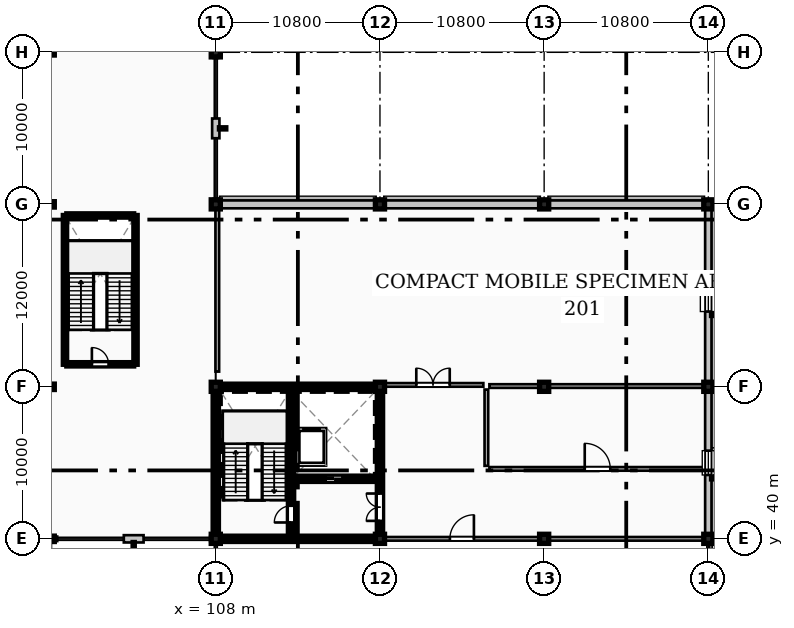
"""IFC4 building model, lengths in metres.
Left out: names, types, materials, properties, quantities, classifications, styles, units other than length and angle.
Written with IfcOpenShell. Run it as: python <this file> out.ifc"""

import sys

from ifc_helpers import new_model, si_unit, direction, frame, frame_2d, origin, origin_2d, place, context, subcontext, project, spatial, rectangle, hollow_circle, extrude, element, fill, save


model = new_model("IFC4")
c1 = context("Model", 3, precision=1e-05, world=origin(), true_north=direction((0.0, 1.0)))
c2 = subcontext(c1, "Body", "Model", "MODEL_VIEW")
j1 = project(units=[si_unit("LENGTHUNIT", "METRE"), si_unit("PLANEANGLEUNIT", "RADIAN")], contexts=[c1])
p1 = place(None, origin())
s1 = spatial("IfcSite", under=j1, at=p1, CompositionType="ELEMENT")
p2 = place(p1, origin())
s2 = spatial("IfcBuilding", under=s1, at=p2, CompositionType="ELEMENT")
p3 = place(p2, frame((0.0, 0.0, 9.6)))
s3 = spatial("IfcBuildingStorey", under=s2, at=p3, CompositionType="ELEMENT", Elevation=9.6)
for number, where, z_axis, x_axis in (
    (1, (97.2, 40.0, 0.0), (0.0, 0.0, 1.0), (1.0, 0.0, 0.0)),
    (2, (97.2, 50.0, 0.0), (0.0, 0.0, 1.0), (1.0, 0.0, 0.0)),
    (3, (97.2, 62.0, 0.0), (0.0, 0.0, 1.0), (1.0, 0.0, 0.0)),
    (4, (97.2, 72.0, 0.0), (0.0, 0.0, 1.0), (1.0, 0.0, 0.0)),
):
    element("IfcColumn", number, at=place(p3, frame(where, z_axis=z_axis, x_axis=x_axis)), inside=s3, PredefinedType="COLUMN", context=c2, shape_type="SweptSolid", body=[
        extrude(hollow_circle(Radius=0.178, WallThickness=0.016, at=origin_2d()), origin(), (0.0, 0.0, 1.0), 4.8),
    ])
for number, where, z_axis, x_axis in (
    (5, (108.0, 40.0, 0.0), (0.0, 0.0, 1.0), (1.0, 0.0, 0.0)),
    (6, (108.0, 50.0, 0.0), (0.0, 0.0, 1.0), (1.0, 0.0, 0.0)),
    (7, (108.0, 62.0, 0.0), (0.0, 0.0, 1.0), (1.0, 0.0, 0.0)),
    (8, (108.0, 72.0, 0.0), (0.0, 0.0, 1.0), (1.0, 0.0, 0.0)),
    (9, (118.8, 40.0, 0.0), (0.0, 0.0, 1.0), (1.0, 0.0, 0.0)),
    (10, (118.8, 50.0, 0.0), (0.0, 0.0, 1.0), (1.0, 0.0, 0.0)),
    (11, (118.8, 62.0, 0.0), (0.0, 0.0, 1.0), (1.0, 0.0, 0.0)),
    (12, (129.6, 40.0, 0.0), (0.0, 0.0, 1.0), (1.0, 0.0, 0.0)),
    (13, (129.6, 50.0, 0.0), (0.0, 0.0, 1.0), (1.0, 0.0, 0.0)),
    (14, (129.6, 62.0, 0.0), (0.0, 0.0, 1.0), (1.0, 0.0, 0.0)),
    (15, (140.4, 40.0, 0.0), (0.0, 0.0, 1.0), (1.0, 0.0, 0.0)),
    (16, (140.4, 50.0, 0.0), (0.0, 0.0, 1.0), (1.0, 0.0, 0.0)),
    (17, (140.4, 62.0, 0.0), (0.0, 0.0, 1.0), (1.0, 0.0, 0.0)),
):
    element("IfcColumn", number, at=place(p3, frame(where, z_axis=z_axis, x_axis=x_axis)), inside=s3, PredefinedType="COLUMN", context=c2, shape_type="SweptSolid", body=[
        extrude(rectangle(XDim=0.6, YDim=0.6, at=origin_2d()), origin(), (0.0, 0.0, 1.0), 4.8),
    ])
for number, where, z_axis, x_axis in (
    (18, (108.0, 39.855, 0.0), (0.0, 0.0, 1.0), (0.0, -1.0, 0.0)),
    (19, (140.4, 39.63, 0.0), (0.0, 0.0, 1.0), (0.0, 1.0, 0.0)),
):
    element("IfcWall", number, at=place(p3, frame(where, z_axis=z_axis, x_axis=x_axis)), inside=s3, PredefinedType="STANDARD", context=c2, shape_type="SweptSolid", body=[
        extrude(rectangle(XDim=0.225, YDim=0.3, at=frame_2d((0.113, 0.0))), origin(), (0.0, 0.0, 1.0), 4.56),
    ])
p4 = place(p3, frame((140.4, 40.145, 0.0), z_axis=(0.0, 0.0, 1.0), x_axis=(0.0, 1.0, 0.0)))
e20 = element("IfcWall", 20, at=p4, inside=s3, PredefinedType="STANDARD", context=c2, shape_type="SweptSolid", body=[
    extrude(rectangle(XDim=9.71, YDim=0.42, at=frame_2d((4.855, 0.0))), origin(), (0.0, 0.0, 1.0), 4.13),
])
p5 = place(p4, frame((4.055, 0.0, 1.2)))
e21 = element("IfcOpeningElement", 21, at=p5, cuts=e20, PredefinedType="OPENING", context=c2, shape_type="SweptSolid", body=[
    extrude(rectangle(XDim=1.6, YDim=1.8, at=frame_2d((0.8, 0.9))), frame((0.0, 0.22, 0.0), z_axis=(0.0, -1.0, 0.0), x_axis=(1.0, 0.0, 0.0)), (0.0, 0.0, 1.0), 0.44),
])
p6 = place(p3, frame((140.4, 50.145, 0.0), z_axis=(0.0, 0.0, 1.0), x_axis=(0.0, 1.0, 0.0)))
e22 = element("IfcWall", 22, at=p6, inside=s3, PredefinedType="STANDARD", context=c2, shape_type="SweptSolid", body=[
    extrude(rectangle(XDim=11.71, YDim=0.42, at=frame_2d((5.855, 0.0))), origin(), (0.0, 0.0, 1.0), 4.13),
])
p7 = place(p6, frame((4.805, 0.0, 1.2)))
e23 = element("IfcOpeningElement", 23, at=p7, cuts=e22, PredefinedType="OPENING", context=c2, shape_type="SweptSolid", body=[
    extrude(rectangle(XDim=2.1, YDim=1.6, at=frame_2d((1.05, 0.8))), frame((0.0, 0.22, 0.0), z_axis=(0.0, -1.0, 0.0), x_axis=(1.0, 0.0, 0.0)), (0.0, 0.0, 1.0), 0.44),
])
p8 = place(p3, frame((140.255, 62.0, 0.0), z_axis=(0.0, 0.0, 1.0), x_axis=(-1.0, 0.0, 0.0)))
e24 = element("IfcWall", 24, at=p8, inside=s3, PredefinedType="SOLIDWALL", context=c2, shape_type="SweptSolid", body=[
    extrude(rectangle(XDim=10.51, YDim=0.52, at=frame_2d((5.255, 0.0))), origin(), (0.0, 0.0, 1.0), 4.13),
])
for number, where, z_axis, x_axis in (
    (25, (129.455, 62.0, 0.0), (0.0, 0.0, 1.0), (-1.0, 0.0, 0.0)),
    (26, (118.655, 62.0, 0.0), (0.0, 0.0, 1.0), (-1.0, 0.0, 0.0)),
):
    element("IfcWall", number, at=place(p3, frame(where, z_axis=z_axis, x_axis=x_axis)), inside=s3, PredefinedType="SOLIDWALL", context=c2, shape_type="SweptSolid", body=[
        extrude(rectangle(XDim=10.51, YDim=0.52, at=frame_2d((5.255, 0.0))), origin(), (0.0, 0.0, 1.0), 3.929),
    ])
p9 = place(p3, frame((108.0, 66.35, 0.0), z_axis=(0.0, 0.0, 1.0), x_axis=(0.0, 1.0, 0.0)))
e27 = element("IfcWall", 27, at=p9, inside=s3, PredefinedType="STANDARD", context=c2, shape_type="SweptSolid", body=[
    extrude(rectangle(XDim=1.3, YDim=0.48, at=frame_2d((0.65, 0.0))), origin(), (0.0, 0.0, 1.0), 4.56),
])
for number, where, z_axis, x_axis in (
    (28, (108.0, 62.145, 0.0), (0.0, 0.0, 1.0), (0.0, 1.0, 0.0)),
    (29, (108.0, 71.63, 0.0), (0.0, 0.0, 1.0), (0.0, 1.0, 0.0)),
):
    element("IfcWall", number, at=place(p3, frame(where, z_axis=z_axis, x_axis=x_axis)), inside=s3, PredefinedType="STANDARD", context=c2, shape_type="SweptSolid", body=[
        extrude(rectangle(XDim=0.225, YDim=0.3, at=frame_2d((0.113, 0.0))), origin(), (0.0, 0.0, 1.0), 4.56),
    ])
p10 = place(p3, frame((101.95, 40.0, 0.0), z_axis=(0.0, 0.0, 1.0), x_axis=(1.0, 0.0, 0.0)))
e30 = element("IfcWall", 30, at=p10, inside=s3, PredefinedType="STANDARD", context=c2, shape_type="SweptSolid", body=[
    extrude(rectangle(XDim=1.3, YDim=0.48, at=frame_2d((0.65, 0.0))), origin(), (0.0, 0.0, 1.0), 4.11),
])
for number, where, z_axis, x_axis in (
    (31, (97.345, 40.0, 0.0), (0.0, 0.0, 1.0), (1.0, 0.0, 0.0)),
    (32, (107.63, 40.0, 0.0), (0.0, 0.0, 1.0), (1.0, 0.0, 0.0)),
):
    element("IfcWall", number, at=place(p3, frame(where, z_axis=z_axis, x_axis=x_axis)), inside=s3, PredefinedType="STANDARD", context=c2, shape_type="SweptSolid", body=[
        extrude(rectangle(XDim=0.225, YDim=0.3, at=frame_2d((0.113, 0.0))), origin(), (0.0, 0.0, 1.0), 4.56),
    ])
for number, where, z_axis, x_axis in (
    (33, (108.3, 40.0, 0.0), (0.0, 0.0, 1.0), (1.0, 0.0, 0.0)),
    (34, (108.3, 50.0, 0.0), (0.0, 0.0, 1.0), (1.0, 0.0, 0.0)),
):
    element("IfcWall", number, at=place(p3, frame(where, z_axis=z_axis, x_axis=x_axis)), inside=s3, PredefinedType="SHEAR", context=c2, shape_type="SweptSolid", body=[
        extrude(rectangle(XDim=10.2, YDim=0.35, at=frame_2d((5.1, 0.0))), origin(), (0.0, 0.0, 1.0), 4.56),
    ])
p11 = place(p3, frame((108.0, 40.3, 0.0), z_axis=(0.0, 0.0, 1.0), x_axis=(0.0, 1.0, 0.0)))
e35 = element("IfcWall", 35, at=p11, inside=s3, PredefinedType="SHEAR", context=c2, shape_type="SweptSolid", body=[
    extrude(rectangle(XDim=9.4, YDim=0.35, at=frame_2d((4.7, 0.0))), origin(), (0.0, 0.0, 1.0), 4.56),
])
p12 = place(p3, frame((118.8, 40.3, 0.0), z_axis=(0.0, 0.0, 1.0), x_axis=(0.0, 1.0, 0.0)))
e36 = element("IfcWall", 36, at=p12, inside=s3, PredefinedType="SHEAR", context=c2, shape_type="SweptSolid", body=[
    extrude(rectangle(XDim=9.4, YDim=0.35, at=frame_2d((4.7, 0.0))), origin(), (0.0, 0.0, 1.0), 4.56),
])
p13 = place(p12, frame((0.88, 0.0, 0.0)))
e37 = element("IfcOpeningElement", 37, at=p13, cuts=e36, PredefinedType="OPENING", context=c2, shape_type="SweptSolid", body=[
    extrude(rectangle(XDim=1.8, YDim=2.25, at=frame_2d((0.9, 1.125))), frame((0.0, 0.185, 0.0), z_axis=(0.0, -1.0, 0.0), x_axis=(1.0, 0.0, 0.0)), (0.0, 0.0, 1.0), 0.37),
])
p14 = place(p3, frame((112.95, 40.175, 0.0), z_axis=(0.0, 0.0, 1.0), x_axis=(0.0, 1.0, 0.0)))
e38 = element("IfcWall", 38, at=p14, inside=s3, PredefinedType="SHEAR", context=c2, shape_type="SweptSolid", body=[
    extrude(rectangle(XDim=9.65, YDim=0.35, at=frame_2d((4.825, 0.0))), origin(), (0.0, 0.0, 1.0), 4.56),
])
p15 = place(p14, frame((0.9, 0.0, 0.0)))
e39 = element("IfcOpeningElement", 39, at=p15, cuts=e38, PredefinedType="OPENING", context=c2, shape_type="SweptSolid", body=[
    extrude(rectangle(XDim=1.1, YDim=2.2, at=frame_2d((0.55, 1.1))), frame((0.0, 0.185, 0.0), z_axis=(0.0, -1.0, 0.0), x_axis=(1.0, 0.0, 0.0)), (0.0, 0.0, 1.0), 0.37),
])
p16 = place(p3, frame((113.13, 43.95, 0.0), z_axis=(0.0, 0.0, 1.0), x_axis=(1.0, 0.0, 0.0)))
e40 = element("IfcWall", 40, at=p16, inside=s3, PredefinedType="SHEAR", context=c2, shape_type="SweptSolid", body=[
    extrude(rectangle(XDim=5.49, YDim=0.35, at=frame_2d((2.745, 0.0))), origin(), (0.0, 0.0, 1.0), 4.56),
])
p17 = place(p16, frame((2.1, 0.0, 0.0)))
e41 = element("IfcOpeningElement", 41, at=p17, cuts=e40, PredefinedType="OPENING", context=c2, shape_type="SweptSolid", body=[
    extrude(rectangle(XDim=1.1, YDim=2.2, at=frame_2d((0.55, 1.1))), frame((0.0, 0.185, 0.0), z_axis=(0.0, -1.0, 0.0), x_axis=(1.0, 0.0, 0.0)), (0.0, 0.0, 1.0), 0.37),
])
for number, where, z_axis, x_axis in (
    (42, (98.08, 51.48, 0.0), (0.0, 0.0, 1.0), (0.0, 1.0, 0.0)),
    (43, (102.72, 51.48, 0.0), (0.0, 0.0, 1.0), (0.0, 1.0, 0.0)),
):
    element("IfcWall", number, at=place(p3, frame(where, z_axis=z_axis, x_axis=x_axis)), inside=s3, PredefinedType="SHEAR", context=c2, shape_type="SweptSolid", body=[
        extrude(rectangle(XDim=9.79, YDim=0.22, at=frame_2d((4.895, 0.0))), origin(), (0.0, 0.0, 1.0), 4.56),
    ])
p18 = place(p3, frame((98.2, 61.27, 0.0), z_axis=(0.0, 0.0, 1.0), x_axis=(1.0, 0.0, 0.0)))
e44 = element("IfcWall", 44, at=p18, inside=s3, PredefinedType="SHEAR", context=c2, shape_type="SweptSolid", body=[
    extrude(rectangle(XDim=4.4, YDim=0.22, at=frame_2d((2.2, 0.0))), origin(), (0.0, 0.0, 1.0), 4.56),
])
p19 = place(p3, frame((98.2, 51.48, 0.0), z_axis=(0.0, 0.0, 1.0), x_axis=(1.0, 0.0, 0.0)))
e45 = element("IfcWall", 45, at=p19, inside=s3, PredefinedType="SHEAR", context=c2, shape_type="SweptSolid", body=[
    extrude(rectangle(XDim=4.4, YDim=0.22, at=frame_2d((2.2, 0.0))), origin(), (0.0, 0.0, 1.0), 4.56),
])
p20 = place(p19, frame((1.65, 0.0, 0.0)))
e46 = element("IfcOpeningElement", 46, at=p20, cuts=e45, PredefinedType="OPENING", context=c2, shape_type="SweptSolid", body=[
    extrude(rectangle(XDim=1.1, YDim=2.2, at=frame_2d((0.55, 1.1))), frame((0.0, 0.12, 0.0), z_axis=(0.0, -1.0, 0.0), x_axis=(1.0, 0.0, 0.0)), (0.0, 0.0, 1.0), 0.24),
])
p21 = place(p3, frame((118.98, 40.0, 0.0), z_axis=(0.0, 0.0, 1.0), x_axis=(1.0, 0.0, 0.0)))
e47 = element("IfcWall", 47, at=p21, inside=s3, PredefinedType="SOLIDWALL", context=c2, shape_type="SweptSolid", body=[
    extrude(rectangle(XDim=10.42, YDim=0.24, at=frame_2d((5.21, 0.0))), origin(), (0.0, 0.0, 1.0), 3.929),
])
p22 = place(p21, frame((4.42, 0.0, 0.0)))
e48 = element("IfcOpeningElement", 48, at=p22, cuts=e47, PredefinedType="OPENING", context=c2, shape_type="SweptSolid", body=[
    extrude(rectangle(XDim=1.58, YDim=2.48, at=frame_2d((0.79, 1.24))), frame((0.0, 0.13, 0.0), z_axis=(0.0, -1.0, 0.0), x_axis=(1.0, 0.0, 0.0)), (0.0, 0.0, 1.0), 0.26),
])
p23 = place(p3, frame((129.8, 40.0, 0.0), z_axis=(0.0, 0.0, 1.0), x_axis=(1.0, 0.0, 0.0)))
e49 = element("IfcWall", 49, at=p23, inside=s3, PredefinedType="SOLIDWALL", context=c2, shape_type="SweptSolid", body=[
    extrude(rectangle(XDim=10.42, YDim=0.24, at=frame_2d((5.21, 0.0))), origin(), (0.0, 0.0, 1.0), 4.13),
])
p24 = place(p3, frame((126.0, 44.6, 0.0), z_axis=(0.0, 0.0, 1.0), x_axis=(1.0, 0.0, 0.0)))
e50 = element("IfcWall", 50, at=p24, inside=s3, PredefinedType="SOLIDWALL", context=c2, shape_type="SweptSolid", body=[
    extrude(rectangle(XDim=14.22, YDim=0.24, at=frame_2d((7.11, 0.0))), origin(), (0.0, 0.0, 1.0), 4.52),
])
p25 = place(p24, frame((6.27, 0.0, 0.0)))
e51 = element("IfcOpeningElement", 51, at=p25, cuts=e50, PredefinedType="OPENING", context=c2, shape_type="SweptSolid", body=[
    extrude(rectangle(XDim=1.68, YDim=2.52, at=frame_2d((0.84, 1.26))), frame((0.0, 0.13, 0.0), z_axis=(0.0, -1.0, 0.0), x_axis=(1.0, 0.0, 0.0)), (0.0, 0.0, 1.0), 0.26),
])
p26 = place(p3, frame((118.98, 50.125, 0.0), z_axis=(0.0, 0.0, 1.0), x_axis=(1.0, 0.0, 0.0)))
e52 = element("IfcWall", 52, at=p26, inside=s3, PredefinedType="SOLIDWALL", context=c2, shape_type="SweptSolid", body=[
    extrude(rectangle(XDim=6.62, YDim=0.24, at=frame_2d((3.31, 0.0))), origin(), (0.0, 0.0, 1.0), 3.929),
])
p27 = place(p26, frame((2.21, 0.0, 0.0)))
e53 = element("IfcOpeningElement", 53, at=p27, cuts=e52, PredefinedType="OPENING", context=c2, shape_type="SweptSolid", body=[
    extrude(rectangle(XDim=2.2, YDim=2.6, at=frame_2d((1.1, 1.3))), frame((0.0, 0.13, 0.0), z_axis=(0.0, -1.0, 0.0), x_axis=(1.0, 0.0, 0.0)), (0.0, 0.0, 1.0), 0.26),
])
p28 = place(p3, frame((126.0, 50.05, 0.0), z_axis=(0.0, 0.0, 1.0), x_axis=(1.0, 0.0, 0.0)))
e54 = element("IfcWall", 54, at=p28, inside=s3, PredefinedType="SOLIDWALL", context=c2, shape_type="SweptSolid", body=[
    extrude(rectangle(XDim=3.4, YDim=0.24, at=frame_2d((1.7, 0.0))), origin(), (0.0, 0.0, 1.0), 3.929),
])
p29 = place(p3, frame((129.8, 50.05, 0.0), z_axis=(0.0, 0.0, 1.0), x_axis=(1.0, 0.0, 0.0)))
e55 = element("IfcWall", 55, at=p29, inside=s3, PredefinedType="SOLIDWALL", context=c2, shape_type="SweptSolid", body=[
    extrude(rectangle(XDim=10.42, YDim=0.24, at=frame_2d((5.21, 0.0))), origin(), (0.0, 0.0, 1.0), 4.13),
])
p30 = place(p3, frame((108.1, 51.0, 0.0), z_axis=(0.0, 0.0, 1.0), x_axis=(0.0, 1.0, 0.0)))
e56 = element("IfcWall", 56, at=p30, inside=s3, PredefinedType="SOLIDWALL", context=c2, shape_type="SweptSolid", body=[
    extrude(rectangle(XDim=10.82, YDim=0.24, at=frame_2d((5.41, 0.0))), origin(), (0.0, 0.0, 1.0), 3.92),
])
p31 = place(p3, frame((125.8, 44.8, 0.0), z_axis=(0.0, 0.0, 1.0), x_axis=(0.0, 1.0, 0.0)))
e57 = element("IfcWall", 57, at=p31, inside=s3, PredefinedType="SOLIDWALL", context=c2, shape_type="SweptSolid", body=[
    extrude(rectangle(XDim=5.02, YDim=0.24, at=frame_2d((2.51, 0.0))), origin(), (0.0, 0.0, 1.0), 4.52),
])
p32 = place(p5, origin())
e58 = element("IfcWindow", 58, at=p32, inside=s3, PartitioningType="SINGLE_PANEL", PredefinedType="WINDOW", context=c2, shape_type="SweptSolid", body=[
    extrude(rectangle(XDim=1.6, YDim=1.8, at=frame_2d((0.8, 0.9))), frame((0.0, 0.03, 0.0), z_axis=(0.0, -1.0, 0.0), x_axis=(1.0, 0.0, 0.0)), (0.0, 0.0, 1.0), 0.06),
])
fill(e21, e58)
p33 = place(p7, origin())
e59 = element("IfcWindow", 59, at=p33, inside=s3, PartitioningType="SINGLE_PANEL", PredefinedType="WINDOW", context=c2, shape_type="SweptSolid", body=[
    extrude(rectangle(XDim=2.1, YDim=1.6, at=frame_2d((1.05, 0.8))), frame((0.0, 0.03, 0.0), z_axis=(0.0, -1.0, 0.0), x_axis=(1.0, 0.0, 0.0)), (0.0, 0.0, 1.0), 0.06),
])
fill(e23, e59)
p34 = place(p15, origin())
e60 = element("IfcDoor", 60, at=p34, inside=s3, OperationType="SINGLE_SWING_LEFT", PredefinedType="DOOR", context=c2, shape_type="SweptSolid", body=[
    extrude(rectangle(XDim=1.1, YDim=2.2, at=frame_2d((0.55, 1.1))), frame((0.0, 0.025, 0.0), z_axis=(0.0, -1.0, 0.0), x_axis=(1.0, 0.0, 0.0)), (0.0, 0.0, 1.0), 0.05),
])
fill(e39, e60)
p35 = place(p13, origin())
e61 = element("IfcDoor", 61, at=p35, inside=s3, OperationType="DOUBLE_DOOR_SINGLE_SWING", PredefinedType="DOOR", context=c2, shape_type="SweptSolid", body=[
    extrude(rectangle(XDim=1.8, YDim=2.25, at=frame_2d((0.9, 1.125))), frame((0.0, 0.025, 0.0), z_axis=(0.0, -1.0, 0.0), x_axis=(1.0, 0.0, 0.0)), (0.0, 0.0, 1.0), 0.05),
])
fill(e37, e61)
p36 = place(p17, origin())
e62 = element("IfcDoor", 62, at=p36, inside=s3, OperationType="DOUBLE_DOOR_SLIDING", PredefinedType="DOOR", context=c2, shape_type="SweptSolid", body=[
    extrude(rectangle(XDim=1.1, YDim=2.2, at=frame_2d((0.55, 1.1))), frame((0.0, 0.025, 0.0), z_axis=(0.0, -1.0, 0.0), x_axis=(1.0, 0.0, 0.0)), (0.0, 0.0, 1.0), 0.05),
])
fill(e41, e62)
p37 = place(p20, origin())
e63 = element("IfcDoor", 63, at=p37, inside=s3, OperationType="SINGLE_SWING_LEFT", PredefinedType="DOOR", context=c2, shape_type="SweptSolid", body=[
    extrude(rectangle(XDim=1.1, YDim=2.2, at=frame_2d((0.55, 1.1))), frame((0.0, 0.025, 0.0), z_axis=(0.0, -1.0, 0.0), x_axis=(1.0, 0.0, 0.0)), (0.0, 0.0, 1.0), 0.05),
])
fill(e46, e63)
p38 = place(p22, origin())
e64 = element("IfcDoor", 64, at=p38, inside=s3, OperationType="SINGLE_SWING_RIGHT", PredefinedType="DOOR", context=c2, shape_type="SweptSolid", body=[
    extrude(rectangle(XDim=1.58, YDim=2.48, at=frame_2d((0.79, 1.24))), frame((0.0, 0.025, 0.0), z_axis=(0.0, -1.0, 0.0), x_axis=(1.0, 0.0, 0.0)), (0.0, 0.0, 1.0), 0.05),
])
fill(e48, e64)
p39 = place(p25, origin())
e65 = element("IfcDoor", 65, at=p39, inside=s3, OperationType="SINGLE_SWING_LEFT", PredefinedType="DOOR", context=c2, shape_type="SweptSolid", body=[
    extrude(rectangle(XDim=1.68, YDim=2.52, at=frame_2d((0.84, 1.26))), frame((0.0, 0.025, 0.0), z_axis=(0.0, -1.0, 0.0), x_axis=(1.0, 0.0, 0.0)), (0.0, 0.0, 1.0), 0.05),
])
fill(e51, e65)
p40 = place(p27, origin())
e66 = element("IfcDoor", 66, at=p40, inside=s3, OperationType="DOUBLE_DOOR_SINGLE_SWING", PredefinedType="DOOR", context=c2, shape_type="SweptSolid", body=[
    extrude(rectangle(XDim=2.2, YDim=2.6, at=frame_2d((1.1, 1.3))), frame((0.0, 0.025, 0.0), z_axis=(0.0, -1.0, 0.0), x_axis=(1.0, 0.0, 0.0)), (0.0, 0.0, 1.0), 0.05),
])
fill(e53, e66)
save(model, sys.argv[1])
